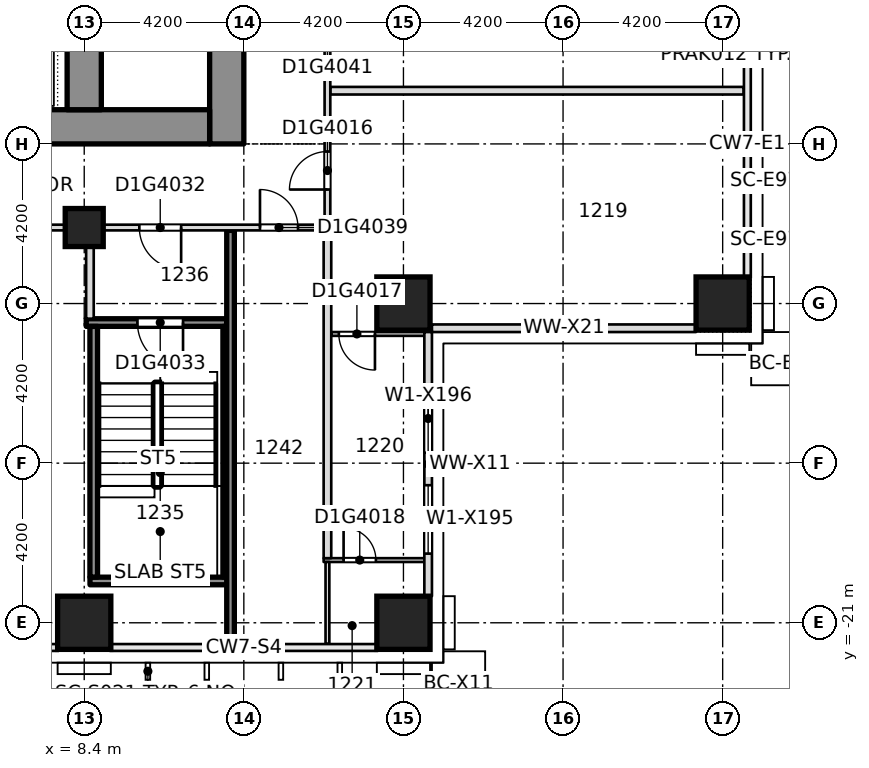
"""IFC4 building model, lengths in metres.
Left out: names, types, materials, properties, quantities, classifications, styles, units other than length and angle.
Written with IfcOpenShell. Run it as: python <this file> out.ifc"""

import sys

from ifc_helpers import new_model, si_unit, direction, frame, frame_2d, origin, origin_2d, place, context, subcontext, project, spatial, rectangle, extrude, element, fill, save


model = new_model("IFC4")
c1 = context("Model", 3, precision=1e-05, world=origin(), true_north=direction((0.0, 1.0)))
c2 = subcontext(c1, "Body", "Model", "MODEL_VIEW")
j1 = project(units=[si_unit("LENGTHUNIT", "METRE"), si_unit("PLANEANGLEUNIT", "RADIAN")], contexts=[c1])
p1 = place(None, origin())
s1 = spatial("IfcSite", under=j1, at=p1, CompositionType="ELEMENT")
p2 = place(p1, origin())
s2 = spatial("IfcBuilding", under=s1, at=p2, CompositionType="ELEMENT")
p3 = place(p2, frame((0.0, 0.0, 55.2)))
s3 = spatial("IfcBuildingStorey", under=s2, at=p3, CompositionType="ELEMENT", Elevation=55.2)
p4 = place(p3, frame((12.15, -8.4, -0.32), z_axis=(0.0, 0.0, 1.0), x_axis=(0.0, 1.0, 0.0)))
e1 = element("IfcWall", 1, at=p4, inside=s3, PredefinedType="SHEAR", context=c2, shape_type="SweptSolid", body=[
    extrude(rectangle(XDim=30.15, YDim=0.9, at=frame_2d((15.075, 0.0))), origin(), (0.0, 0.0, 1.0), 3.45),
])
p5 = place(p4, frame((2.925, 0.0, 0.32)))
e2 = element("IfcOpeningElement", 2, at=p5, cuts=e1, PredefinedType="OPENING", context=c2, shape_type="SweptSolid", body=[
    extrude(rectangle(XDim=0.95, YDim=2.1, at=frame_2d((0.475, 1.05))), frame((0.0, 0.46, 0.0), z_axis=(0.0, -1.0, 0.0), x_axis=(1.0, 0.0, 0.0)), (0.0, 0.0, 1.0), 0.92),
])
p6 = place(p4, frame((7.025, 0.0, 0.32)))
e3 = element("IfcOpeningElement", 3, at=p6, cuts=e1, PredefinedType="OPENING", context=c2, shape_type="SweptSolid", body=[
    extrude(rectangle(XDim=0.95, YDim=2.1, at=frame_2d((0.475, 1.05))), frame((0.0, 0.46, 0.0), z_axis=(0.0, -1.0, 0.0), x_axis=(1.0, 0.0, 0.0)), (0.0, 0.0, 1.0), 0.92),
])
p7 = place(p4, frame((10.875, 0.0, 0.32)))
e4 = element("IfcOpeningElement", 4, at=p7, cuts=e1, PredefinedType="OPENING", context=c2, shape_type="SweptSolid", body=[
    extrude(rectangle(XDim=0.95, YDim=2.1, at=frame_2d((0.475, 1.05))), frame((0.0, 0.46, 0.0), z_axis=(0.0, -1.0, 0.0), x_axis=(1.0, 0.0, 0.0)), (0.0, 0.0, 1.0), 0.92),
])
p8 = place(p4, frame((15.625, 0.0, 0.32)))
e5 = element("IfcOpeningElement", 5, at=p8, cuts=e1, PredefinedType="OPENING", context=c2, shape_type="SweptSolid", body=[
    extrude(rectangle(XDim=0.95, YDim=2.1, at=frame_2d((0.475, 1.05))), frame((0.0, 0.46, 0.0), z_axis=(0.0, -1.0, 0.0), x_axis=(1.0, 0.0, 0.0)), (0.0, 0.0, 1.0), 0.92),
])
p9 = place(p4, frame((24.75, 0.0, 0.32)))
e6 = element("IfcOpeningElement", 6, at=p9, cuts=e1, PredefinedType="OPENING", context=c2, shape_type="SweptSolid", body=[
    extrude(rectangle(XDim=0.95, YDim=2.1, at=frame_2d((0.475, 1.05))), frame((0.0, 0.46, 0.0), z_axis=(0.0, -1.0, 0.0), x_axis=(1.0, 0.0, 0.0)), (0.0, 0.0, 1.0), 0.92),
])
p10 = place(p4, frame((19.3, 0.0, 0.32)))
e7 = element("IfcOpeningElement", 7, at=p10, cuts=e1, PredefinedType="OPENING", context=c2, shape_type="SweptSolid", body=[
    extrude(rectangle(XDim=1.2, YDim=2.1, at=frame_2d((0.6, 1.05))), frame((0.0, 0.46, 0.0), z_axis=(0.0, -1.0, 0.0), x_axis=(1.0, 0.0, 0.0)), (0.0, 0.0, 1.0), 0.92),
])
p11 = place(p3, frame((-11.7, -7.95, -0.32), z_axis=(0.0, 0.0, 1.0), x_axis=(1.0, 0.0, 0.0)))
e8 = element("IfcWall", 8, at=p11, inside=s3, PredefinedType="SHEAR", context=c2, shape_type="SweptSolid", body=[
    extrude(rectangle(XDim=23.4, YDim=0.9, at=frame_2d((11.7, 0.0))), origin(), (0.0, 0.0, 1.0), 3.45),
])
p12 = place(p11, frame((6.95, 0.0, 0.32)))
e9 = element("IfcOpeningElement", 9, at=p12, cuts=e8, PredefinedType="OPENING", context=c2, shape_type="SweptSolid", body=[
    extrude(rectangle(XDim=1.8, YDim=2.1, at=frame_2d((0.9, 1.05))), frame((0.0, 0.46, 0.0), z_axis=(0.0, -1.0, 0.0), x_axis=(1.0, 0.0, 0.0)), (0.0, 0.0, 1.0), 0.92),
])
p13 = place(p11, frame((14.65, 0.0, 0.32)))
e10 = element("IfcOpeningElement", 10, at=p13, cuts=e8, PredefinedType="OPENING", context=c2, shape_type="SweptSolid", body=[
    extrude(rectangle(XDim=1.8, YDim=2.1, at=frame_2d((0.9, 1.05))), frame((0.0, 0.46, 0.0), z_axis=(0.0, -1.0, 0.0), x_axis=(1.0, 0.0, 0.0)), (0.0, 0.0, 1.0), 0.92),
])
p14 = place(p3, frame((8.4, -7.5, -0.32), z_axis=(0.0, 0.0, 1.0), x_axis=(0.0, 1.0, 0.0)))
e11 = element("IfcWall", 11, at=p14, inside=s3, PredefinedType="SHEAR", context=c2, shape_type="SweptSolid", body=[
    extrude(rectangle(XDim=28.35, YDim=0.9, at=frame_2d((14.175, 0.0))), origin(), (0.0, 0.0, 1.0), 3.45),
])
p15 = place(p14, frame((18.4, 0.0, 0.32)))
e12 = element("IfcOpeningElement", 12, at=p15, cuts=e11, PredefinedType="OPENING", context=c2, shape_type="SweptSolid", body=[
    extrude(rectangle(XDim=1.2, YDim=2.1, at=frame_2d((0.6, 1.05))), frame((0.0, 0.46, 0.0), z_axis=(0.0, -1.0, 0.0), x_axis=(1.0, 0.0, 0.0)), (0.0, 0.0, 1.0), 0.92),
])
for number, where, z_axis, x_axis in (
    (13, (8.4, -21.0, -0.32), (0.0, 0.0, 1.0), (1.0, 0.0, 0.0)),
    (14, (16.8, -21.0, -0.32), (0.0, 0.0, 1.0), (1.0, 0.0, 0.0)),
    (15, (16.8, -12.6, -0.32), (0.0, 0.0, 1.0), (1.0, 0.0, 0.0)),
    (16, (25.2, -12.6, -0.32), (0.0, 0.0, 1.0), (1.0, 0.0, 0.0)),
):
    element("IfcColumn", number, at=place(p3, frame(where, z_axis=z_axis, x_axis=x_axis)), inside=s3, PredefinedType="COLUMN", context=c2, shape_type="SweptSolid", body=[
        extrude(rectangle(XDim=1.4, YDim=1.4, at=origin_2d()), origin(), (0.0, 0.0, 1.0), 3.45),
    ])
p16 = place(p3, frame((8.4, -10.6, -0.32), z_axis=(0.0, 0.0, 1.0), x_axis=(1.0, 0.0, 0.0)))
e17 = element("IfcColumn", 17, at=p16, inside=s3, PredefinedType="COLUMN", context=c2, shape_type="SweptSolid", body=[
    extrude(rectangle(XDim=1.0, YDim=1.0, at=origin_2d()), origin(), (0.0, 0.0, 1.0), 3.45),
])
p17 = place(p3, frame((8.552, -19.9, 0.0), z_axis=(0.0, 0.0, 1.0), x_axis=(1.0, 0.0, 0.0)))
e18 = element("IfcWall", 18, at=p17, inside=s3, PredefinedType="SOLIDWALL", context=c2, shape_type="SweptSolid", body=[
    extrude(rectangle(XDim=3.696, YDim=0.2, at=frame_2d((1.848, 0.0))), origin(), (0.0, 0.0, 1.0), 3.13),
])
p18 = place(p3, frame((14.7, -19.35, 0.0), z_axis=(0.0, 0.0, 1.0), x_axis=(1.0, 0.0, 0.0)))
e19 = element("IfcWall", 19, at=p18, inside=s3, PredefinedType="PARTITIONING", context=c2, shape_type="SweptSolid", body=[
    extrude(rectangle(XDim=2.65, YDim=0.1, at=frame_2d((1.325, 0.0))), origin(), (0.0, 0.0, 1.0), 3.13),
])
p19 = place(p18, frame((0.525, 0.0, 0.0)))
e20 = element("IfcOpeningElement", 20, at=p19, cuts=e19, PredefinedType="OPENING", context=c2, shape_type="SweptSolid", body=[
    extrude(rectangle(XDim=0.85, YDim=2.1, at=frame_2d((0.425, 1.05))), frame((0.0, 0.06, 0.0), z_axis=(0.0, -1.0, 0.0), x_axis=(1.0, 0.0, 0.0)), (0.0, 0.0, 1.0), 0.12),
])
p20 = place(p3, frame((14.9, -13.4, 0.0), z_axis=(0.0, 0.0, 1.0), x_axis=(1.0, 0.0, 0.0)))
e21 = element("IfcWall", 21, at=p20, inside=s3, PredefinedType="PARTITIONING", context=c2, shape_type="SweptSolid", body=[
    extrude(rectangle(XDim=2.45, YDim=0.1, at=frame_2d((1.225, 0.0))), origin(), (0.0, 0.0, 1.0), 3.13),
])
p21 = place(p20, frame((0.2, 0.0, 0.0)))
e22 = element("IfcOpeningElement", 22, at=p21, cuts=e21, PredefinedType="OPENING", context=c2, shape_type="SweptSolid", body=[
    extrude(rectangle(XDim=0.95, YDim=2.1, at=frame_2d((0.475, 1.05))), frame((0.0, 0.06, 0.0), z_axis=(0.0, -1.0, 0.0), x_axis=(1.0, 0.0, 0.0)), (0.0, 0.0, 1.0), 0.12),
])
p22 = place(p3, frame((8.452, -13.1, 0.0), z_axis=(0.0, 0.0, 1.0), x_axis=(1.0, 0.0, 0.0)))
e23 = element("IfcWall", 23, at=p22, inside=s3, PredefinedType="SOLIDWALL", context=c2, shape_type="SweptSolid", body=[
    extrude(rectangle(XDim=3.696, YDim=0.2, at=frame_2d((1.848, 0.0))), origin(), (0.0, 0.0, 1.0), 3.13),
])
p23 = place(p22, frame((1.348, 0.0, 0.0)))
e24 = element("IfcOpeningElement", 24, at=p23, cuts=e23, PredefinedType="OPENING", context=c2, shape_type="SweptSolid", body=[
    extrude(rectangle(XDim=1.2, YDim=2.1, at=frame_2d((0.6, 1.05))), frame((0.0, 0.11, 0.0), z_axis=(0.0, -1.0, 0.0), x_axis=(1.0, 0.0, 0.0)), (0.0, 0.0, 1.0), 0.22),
])
p24 = place(p3, frame((-1.9, -10.6, 0.0), z_axis=(0.0, 0.0, 1.0), x_axis=(1.0, 0.0, 0.0)))
e25 = element("IfcWall", 25, at=p24, inside=s3, PredefinedType="PARTITIONING", context=c2, shape_type="SweptSolid", body=[
    extrude(rectangle(XDim=16.8, YDim=0.15, at=frame_2d((8.4, 0.0))), origin(), (0.0, 0.0, 1.0), 3.13),
])
p25 = place(p24, frame((6.625, 0.0, 0.0)))
e26 = element("IfcOpeningElement", 26, at=p25, cuts=e25, PredefinedType="OPENING", context=c2, shape_type="SweptSolid", body=[
    extrude(rectangle(XDim=0.95, YDim=2.1, at=frame_2d((0.475, 1.05))), frame((0.0, 0.085, 0.0), z_axis=(0.0, -1.0, 0.0), x_axis=(1.0, 0.0, 0.0)), (0.0, 0.0, 1.0), 0.17),
])
p26 = place(p24, frame((2.5, 0.0, 0.0)))
e27 = element("IfcOpeningElement", 27, at=p26, cuts=e25, PredefinedType="OPENING", context=c2, shape_type="SweptSolid", body=[
    extrude(rectangle(XDim=1.1, YDim=2.1, at=frame_2d((0.55, 1.05))), frame((0.0, 0.085, 0.0), z_axis=(0.0, -1.0, 0.0), x_axis=(1.0, 0.0, 0.0)), (0.0, 0.0, 1.0), 0.17),
])
p27 = place(p24, frame((11.75, 0.0, 0.0)))
e28 = element("IfcOpeningElement", 28, at=p27, cuts=e25, PredefinedType="OPENING", context=c2, shape_type="SweptSolid", body=[
    extrude(rectangle(XDim=1.1, YDim=2.1, at=frame_2d((0.55, 1.05))), frame((0.0, 0.085, 0.0), z_axis=(0.0, -1.0, 0.0), x_axis=(1.0, 0.0, 0.0)), (0.0, 0.0, 1.0), 0.17),
])
p28 = place(p24, frame((14.925, 0.0, 0.0)))
e29 = element("IfcOpeningElement", 29, at=p28, cuts=e25, PredefinedType="OPENING", context=c2, shape_type="SweptSolid", body=[
    extrude(rectangle(XDim=1.0, YDim=2.1, at=frame_2d((0.5, 1.05))), frame((0.0, 0.085, 0.0), z_axis=(0.0, -1.0, 0.0), x_axis=(1.0, 0.0, 0.0)), (0.0, 0.0, 1.0), 0.17),
])
p29 = place(p3, frame((14.875, -7.0, 0.0), z_axis=(0.0, 0.0, 1.0), x_axis=(1.0, 0.0, 0.0)))
e30 = element("IfcWall", 30, at=p29, inside=s3, PredefinedType="PARTITIONING", context=c2, shape_type="SweptSolid", body=[
    extrude(rectangle(XDim=10.875, YDim=0.2, at=frame_2d((5.438, 0.0))), origin(), (0.0, 0.0, 1.0), 3.13),
])
p30 = place(p3, frame((8.55, -12.998, 0.0), z_axis=(0.0, 0.0, 1.0), x_axis=(0.0, 1.0, 0.0)))
e31 = element("IfcWall", 31, at=p30, inside=s3, PredefinedType="PARTITIONING", context=c2, shape_type="SweptSolid", body=[
    extrude(rectangle(XDim=2.323, YDim=0.2, at=frame_2d((1.162, 0.0))), origin(), (0.0, 0.0, 1.0), 3.13),
])
for number, where, z_axis, x_axis in (
    (32, (8.65, -19.798, 0.0), (0.0, 0.0, 1.0), (0.0, 1.0, 0.0)),
    (33, (12.15, -19.798, 0.0), (0.0, 0.0, 1.0), (0.0, 1.0, 0.0)),
):
    element("IfcWall", number, at=place(p3, frame(where, z_axis=z_axis, x_axis=x_axis)), inside=s3, PredefinedType="SOLIDWALL", context=c2, shape_type="SweptSolid", body=[
        extrude(rectangle(XDim=6.596, YDim=0.2, at=frame_2d((3.298, 0.0))), origin(), (0.0, 0.0, 1.0), 3.13),
    ])
p31 = place(p3, frame((14.8, -21.55, 0.0), z_axis=(0.0, 0.0, 1.0), x_axis=(0.0, 1.0, 0.0)))
e34 = element("IfcWall", 34, at=p31, inside=s3, PredefinedType="PARTITIONING", context=c2, shape_type="SweptSolid", body=[
    extrude(rectangle(XDim=2.15, YDim=0.1, at=frame_2d((1.075, 0.0))), origin(), (0.0, 0.0, 1.0), 3.13),
])
p32 = place(p3, frame((14.8, -19.3, 0.0), z_axis=(0.0, 0.0, 1.0), x_axis=(0.0, 1.0, 0.0)))
e35 = element("IfcWall", 35, at=p32, inside=s3, PredefinedType="PARTITIONING", context=c2, shape_type="SweptSolid", body=[
    extrude(rectangle(XDim=8.625, YDim=0.2, at=frame_2d((4.312, 0.0))), origin(), (0.0, 0.0, 1.0), 3.13),
])
p33 = place(p3, frame((14.8, -10.525, 0.0), z_axis=(0.0, 0.0, 1.0), x_axis=(0.0, 1.0, 0.0)))
e36 = element("IfcWall", 36, at=p33, inside=s3, PredefinedType="PARTITIONING", context=c2, shape_type="SweptSolid", body=[
    extrude(rectangle(XDim=19.155, YDim=0.15, at=frame_2d((9.577, 0.0))), origin(), (0.0, 0.0, 1.0), 3.13),
])
p34 = place(p33, frame((0.925, 0.0, 0.0)))
e37 = element("IfcOpeningElement", 37, at=p34, cuts=e36, PredefinedType="OPENING", context=c2, shape_type="SweptSolid", body=[
    extrude(rectangle(XDim=1.0, YDim=2.1, at=frame_2d((0.5, 1.05))), frame((0.0, 0.085, 0.0), z_axis=(0.0, -1.0, 0.0), x_axis=(1.0, 0.0, 0.0)), (0.0, 0.0, 1.0), 0.17),
])
p35 = place(p33, frame((16.065, 0.0, 0.0)))
e38 = element("IfcOpeningElement", 38, at=p35, cuts=e36, PredefinedType="OPENING", context=c2, shape_type="SweptSolid", body=[
    extrude(rectangle(XDim=1.0, YDim=2.1, at=frame_2d((0.5, 1.05))), frame((0.0, 0.085, 0.0), z_axis=(0.0, -1.0, 0.0), x_axis=(1.0, 0.0, 0.0)), (0.0, 0.0, 1.0), 0.17),
])
p36 = place(p33, frame((9.975, 0.0, 0.0)))
e39 = element("IfcOpeningElement", 39, at=p36, cuts=e36, PredefinedType="OPENING", context=c2, shape_type="SweptSolid", body=[
    extrude(rectangle(XDim=1.1, YDim=2.1, at=frame_2d((0.55, 1.05))), frame((0.0, 0.085, 0.0), z_axis=(0.0, -1.0, 0.0), x_axis=(1.0, 0.0, 0.0)), (0.0, 0.0, 1.0), 0.17),
])
p37 = place(p33, frame((4.725, 0.0, 0.0)))
e40 = element("IfcOpeningElement", 40, at=p37, cuts=e36, PredefinedType="OPENING", context=c2, shape_type="SweptSolid", body=[
    extrude(rectangle(XDim=1.0, YDim=2.1, at=frame_2d((0.5, 1.05))), frame((0.0, 0.085, 0.0), z_axis=(0.0, -1.0, 0.0), x_axis=(1.0, 0.0, 0.0)), (0.0, 0.0, 1.0), 0.17),
])
p38 = place(p3, frame((17.45, -20.3, 0.0), z_axis=(0.0, 0.0, 1.0), x_axis=(0.0, 1.0, 0.0)))
e41 = element("IfcWall", 41, at=p38, inside=s3, PredefinedType="STANDARD", context=c2, shape_type="SweptSolid", body=[
    extrude(rectangle(XDim=6.95, YDim=0.2, at=frame_2d((3.475, 0.0))), origin(), (0.0, 0.0, 1.0), 3.13),
])
p39 = place(p38, frame((1.12, 0.0, 0.2)))
e42 = element("IfcOpeningElement", 42, at=p39, cuts=e41, PredefinedType="OPENING", context=c2, shape_type="SweptSolid", body=[
    extrude(rectangle(XDim=1.8, YDim=2.65, at=frame_2d((0.9, 1.325))), frame((0.0, 0.11, 0.0), z_axis=(0.0, -1.0, 0.0), x_axis=(1.0, 0.0, 0.0)), (0.0, 0.0, 1.0), 0.22),
])
p40 = place(p38, frame((3.775, 0.0, 0.2)))
e43 = element("IfcOpeningElement", 43, at=p40, cuts=e41, PredefinedType="OPENING", context=c2, shape_type="SweptSolid", body=[
    extrude(rectangle(XDim=1.8, YDim=2.65, at=frame_2d((0.9, 1.325))), frame((0.0, 0.11, 0.0), z_axis=(0.0, -1.0, 0.0), x_axis=(1.0, 0.0, 0.0)), (0.0, 0.0, 1.0), 0.22),
])
p41 = place(p3, frame((17.55, -13.25, 0.0), z_axis=(0.0, 0.0, 1.0), x_axis=(1.0, 0.0, 0.0)))
e44 = element("IfcWall", 44, at=p41, inside=s3, PredefinedType="STANDARD", context=c2, shape_type="SweptSolid", body=[
    extrude(rectangle(XDim=6.95, YDim=0.2, at=frame_2d((3.475, 0.0))), origin(), (0.0, 0.0, 1.0), 3.13),
])
p42 = place(p3, frame((12.25, -21.55, 0.0), z_axis=(0.0, 0.0, 1.0), x_axis=(0.0, 1.0, 0.0)))
e45 = element("IfcWall", 45, at=p42, inside=s3, PredefinedType="SOLIDWALL", context=c2, shape_type="SweptSolid", body=[
    extrude(rectangle(XDim=10.875, YDim=0.2, at=frame_2d((5.438, 0.0))), origin(), (0.0, 0.0, 1.0), 3.13),
])
p43 = place(p34, origin())
e46 = element("IfcDoor", 46, at=p43, inside=s3, OperationType="SINGLE_SWING_RIGHT", PredefinedType="DOOR", context=c2, shape_type="SweptSolid", body=[
    extrude(rectangle(XDim=1.0, YDim=2.1, at=frame_2d((0.5, 1.05))), frame((0.0, 0.025, 0.0), z_axis=(0.0, -1.0, 0.0), x_axis=(1.0, 0.0, 0.0)), (0.0, 0.0, 1.0), 0.05),
])
fill(e37, e46)
p44 = place(p21, origin())
e47 = element("IfcDoor", 47, at=p44, inside=s3, OperationType="SINGLE_SWING_RIGHT", PredefinedType="DOOR", context=c2, shape_type="SweptSolid", body=[
    extrude(rectangle(XDim=0.95, YDim=2.1, at=frame_2d((0.475, 1.05))), frame((0.0, 0.025, 0.0), z_axis=(0.0, -1.0, 0.0), x_axis=(1.0, 0.0, 0.0)), (0.0, 0.0, 1.0), 0.05),
])
fill(e22, e47)
p45 = place(p19, origin())
e48 = element("IfcDoor", 48, at=p45, inside=s3, OperationType="SINGLE_SWING_LEFT", PredefinedType="DOOR", context=c2, shape_type="SweptSolid", body=[
    extrude(rectangle(XDim=0.85, YDim=2.1, at=frame_2d((0.425, 1.05))), frame((0.0, 0.025, 0.0), z_axis=(0.0, -1.0, 0.0), x_axis=(1.0, 0.0, 0.0)), (0.0, 0.0, 1.0), 0.05),
])
fill(e20, e48)
p46 = place(p27, origin())
e49 = element("IfcDoor", 49, at=p46, inside=s3, OperationType="SINGLE_SWING_RIGHT", PredefinedType="DOOR", context=c2, shape_type="SweptSolid", body=[
    extrude(rectangle(XDim=1.1, YDim=2.1, at=frame_2d((0.55, 1.05))), frame((0.0, 0.025, 0.0), z_axis=(0.0, -1.0, 0.0), x_axis=(1.0, 0.0, 0.0)), (0.0, 0.0, 1.0), 0.05),
])
fill(e28, e49)
p47 = place(p23, origin())
e50 = element("IfcDoor", 50, at=p47, inside=s3, OperationType="SINGLE_SWING_RIGHT", PredefinedType="DOOR", context=c2, shape_type="SweptSolid", body=[
    extrude(rectangle(XDim=1.2, YDim=2.1, at=frame_2d((0.6, 1.05))), frame((0.0, 0.025, 0.0), z_axis=(0.0, -1.0, 0.0), x_axis=(1.0, 0.0, 0.0)), (0.0, 0.0, 1.0), 0.05),
])
fill(e24, e50)
p48 = place(p28, origin())
e51 = element("IfcDoor", 51, at=p48, inside=s3, OperationType="SINGLE_SWING_LEFT", PredefinedType="DOOR", context=c2, shape_type="SweptSolid", body=[
    extrude(rectangle(XDim=1.0, YDim=2.1, at=frame_2d((0.5, 1.05))), frame((0.0, 0.025, 0.0), z_axis=(0.0, -1.0, 0.0), x_axis=(1.0, 0.0, 0.0)), (0.0, 0.0, 1.0), 0.05),
])
fill(e29, e51)
p49 = place(p39, origin())
e52 = element("IfcWindow", 52, at=p49, inside=s3, PartitioningType="SINGLE_PANEL", PredefinedType="WINDOW", context=c2, shape_type="SweptSolid", body=[
    extrude(rectangle(XDim=1.8, YDim=2.65, at=frame_2d((0.9, 1.325))), frame((0.0, 0.03, 0.0), z_axis=(0.0, -1.0, 0.0), x_axis=(1.0, 0.0, 0.0)), (0.0, 0.0, 1.0), 0.06),
])
fill(e42, e52)
p50 = place(p40, origin())
e53 = element("IfcWindow", 53, at=p50, inside=s3, PartitioningType="SINGLE_PANEL", PredefinedType="WINDOW", context=c2, shape_type="SweptSolid", body=[
    extrude(rectangle(XDim=1.8, YDim=2.65, at=frame_2d((0.9, 1.325))), frame((0.0, 0.03, 0.0), z_axis=(0.0, -1.0, 0.0), x_axis=(1.0, 0.0, 0.0)), (0.0, 0.0, 1.0), 0.06),
])
fill(e43, e53)
save(model, sys.argv[1])
